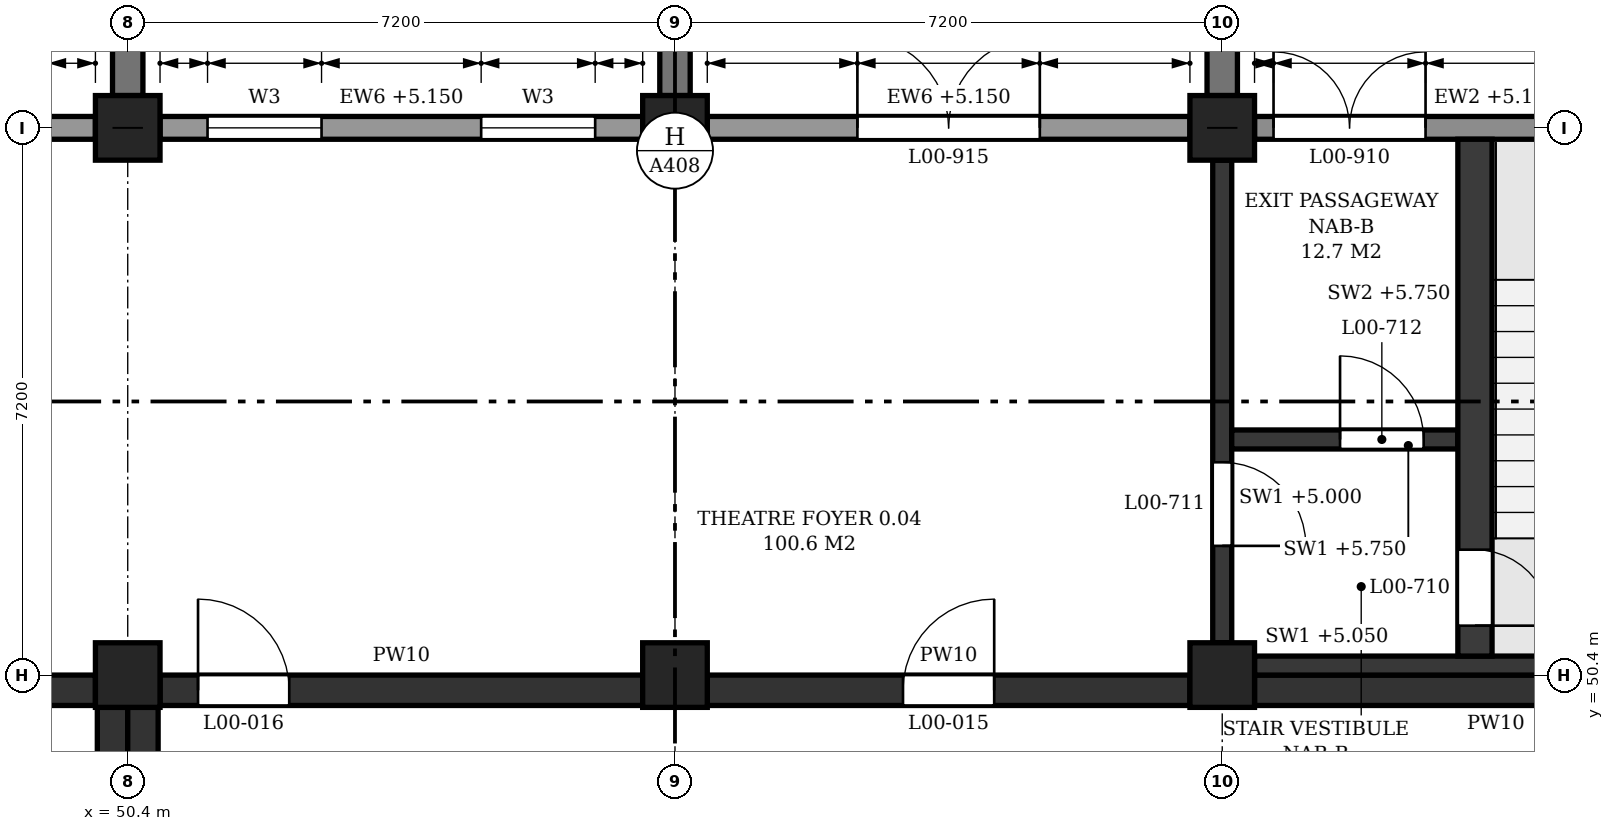
"""IFC4 building model, lengths in metres.
Left out: names, types, materials, properties, quantities, classifications, styles, units other than length and angle.
Written with IfcOpenShell. Run it as: python <this file> out.ifc"""

import sys

from ifc_helpers import new_model, si_unit, direction, frame, frame_2d, origin, origin_2d, place, context, subcontext, project, spatial, polyline, rectangle, outline, extrude, element, fill, save


model = new_model("IFC4")
c1 = context("Model", 3, precision=1e-05, world=origin(), true_north=direction((0.0, 1.0)))
c2 = subcontext(c1, "Body", "Model", "MODEL_VIEW")
j1 = project(units=[si_unit("LENGTHUNIT", "METRE"), si_unit("PLANEANGLEUNIT", "RADIAN")], contexts=[c1])
p1 = place(None, origin())
s1 = spatial("IfcSite", under=j1, at=p1, CompositionType="ELEMENT")
p2 = place(p1, origin())
s2 = spatial("IfcBuilding", under=s1, at=p2, CompositionType="ELEMENT")
p3 = place(p2, origin())
s3 = spatial("IfcBuildingStorey", under=s2, at=p3, CompositionType="ELEMENT", Elevation=0.0)
for number, where, z_axis, x_axis in (
    (1, (50.4, 50.4, 0.0), (0.0, 0.0, 1.0), (1.0, 0.0, 0.0)),
    (2, (50.4, 57.6, 0.0), (0.0, 0.0, 1.0), (1.0, 0.0, 0.0)),
    (3, (57.6, 50.4, 0.0), (0.0, 0.0, 1.0), (1.0, 0.0, 0.0)),
    (4, (57.6, 57.6, 0.0), (0.0, 0.0, 1.0), (1.0, 0.0, 0.0)),
    (5, (64.8, 50.4, 0.0), (0.0, 0.0, 1.0), (1.0, 0.0, 0.0)),
    (6, (64.8, 57.6, 0.0), (0.0, 0.0, 1.0), (1.0, 0.0, 0.0)),
):
    element("IfcColumn", number, at=place(p3, frame(where, z_axis=z_axis, x_axis=x_axis)), inside=s3, PredefinedType="COLUMN", context=c2, shape_type="SweptSolid", body=[
        extrude(rectangle(XDim=0.85, YDim=0.85, at=origin_2d()), origin(), (0.0, 0.0, 1.0), 6.0),
    ])
p4 = place(p3, frame((71.575, 57.6, 0.0), z_axis=(0.0, 0.0, 1.0), x_axis=(-1.0, 0.0, 0.0)))
e7 = element("IfcWall", 7, at=p4, inside=s3, PredefinedType="STANDARD", context=c2, shape_type="SweptSolid", body=[
    extrude(rectangle(XDim=6.35, YDim=0.3, at=frame_2d((3.175, 0.0))), origin(), (0.0, 0.0, 1.0), 5.15),
])
p5 = place(p4, frame((4.1, 0.0, 0.0)))
e8 = element("IfcOpeningElement", 8, at=p5, cuts=e7, PredefinedType="OPENING", context=c2, shape_type="SweptSolid", body=[
    extrude(rectangle(XDim=2.0, YDim=2.1, at=frame_2d((1.0, 1.05))), frame((0.0, 0.16, 0.0), z_axis=(0.0, -1.0, 0.0), x_axis=(1.0, 0.0, 0.0)), (0.0, 0.0, 1.0), 0.32),
])
p6 = place(p4, frame((0.925, 0.0, 0.9)))
e9 = element("IfcOpeningElement", 9, at=p6, cuts=e7, PredefinedType="OPENING", context=c2, shape_type="SweptSolid", body=[
    extrude(outline(polyline([(0.0, 0.0), (0.9, 0.0), (0.9, 3.55), (0.45, 4.0), (0.0, 3.55), (0.0, 0.0)])), frame((0.0, 0.16, 0.0), z_axis=(0.0, -1.0, 0.0), x_axis=(1.0, 0.0, 0.0)), (0.0, 0.0, 1.0), 0.32),
])
p7 = place(p3, frame((64.375, 57.6, 0.0), z_axis=(0.0, 0.0, 1.0), x_axis=(-1.0, 0.0, 0.0)))
e10 = element("IfcWall", 10, at=p7, inside=s3, PredefinedType="STANDARD", context=c2, shape_type="SweptSolid", body=[
    extrude(rectangle(XDim=6.35, YDim=0.3, at=frame_2d((3.175, 0.0))), origin(), (0.0, 0.0, 1.0), 5.15),
])
p8 = place(p7, frame((1.975, 0.0, 0.0)))
e11 = element("IfcOpeningElement", 11, at=p8, cuts=e10, PredefinedType="OPENING", context=c2, shape_type="SweptSolid", body=[
    extrude(outline(polyline([(0.0, 0.0), (2.4, 0.0), (2.4, 2.0), (1.2, 3.2), (0.0, 2.0), (0.0, 0.0)])), frame((0.0, 0.16, 0.0), z_axis=(0.0, -1.0, 0.0), x_axis=(1.0, 0.0, 0.0)), (0.0, 0.0, 1.0), 0.32),
])
p9 = place(p3, frame((57.175, 57.6, 0.0), z_axis=(0.0, 0.0, 1.0), x_axis=(-1.0, 0.0, 0.0)))
e12 = element("IfcWall", 12, at=p9, inside=s3, PredefinedType="STANDARD", context=c2, shape_type="SweptSolid", body=[
    extrude(rectangle(XDim=6.35, YDim=0.3, at=frame_2d((3.175, 0.0))), origin(), (0.0, 0.0, 1.0), 5.15),
])
p10 = place(p9, frame((0.625, 0.0, 0.9)))
e13 = element("IfcOpeningElement", 13, at=p10, cuts=e12, PredefinedType="OPENING", context=c2, shape_type="SweptSolid", body=[
    extrude(outline(polyline([(0.0, 0.0), (1.5, 0.0), (1.5, 3.25), (0.75, 4.0), (0.0, 3.25), (0.0, 0.0)])), frame((0.0, 0.16, 0.0), z_axis=(0.0, -1.0, 0.0), x_axis=(1.0, 0.0, 0.0)), (0.0, 0.0, 1.0), 0.32),
])
p11 = place(p9, frame((4.225, 0.0, 0.9)))
e14 = element("IfcOpeningElement", 14, at=p11, cuts=e12, PredefinedType="OPENING", context=c2, shape_type="SweptSolid", body=[
    extrude(outline(polyline([(0.0, 0.0), (1.5, 0.0), (1.5, 3.25), (0.75, 4.0), (0.0, 3.25), (0.0, 0.0)])), frame((0.0, 0.16, 0.0), z_axis=(0.0, -1.0, 0.0), x_axis=(1.0, 0.0, 0.0)), (0.0, 0.0, 1.0), 0.32),
])
p12 = place(p3, frame((49.975, 57.6, 0.0), z_axis=(0.0, 0.0, 1.0), x_axis=(-1.0, 0.0, 0.0)))
e15 = element("IfcWall", 15, at=p12, inside=s3, PredefinedType="STANDARD", context=c2, shape_type="SweptSolid", body=[
    extrude(rectangle(XDim=6.35, YDim=0.3, at=frame_2d((3.175, 0.0))), origin(), (0.0, 0.0, 1.0), 5.15),
])
p13 = place(p12, frame((0.625, 0.0, 0.9)))
e16 = element("IfcOpeningElement", 16, at=p13, cuts=e15, PredefinedType="OPENING", context=c2, shape_type="SweptSolid", body=[
    extrude(outline(polyline([(0.0, 0.0), (1.5, 0.0), (1.5, 3.25), (0.75, 4.0), (0.0, 3.25), (0.0, 0.0)])), frame((0.0, 0.16, 0.0), z_axis=(0.0, -1.0, 0.0), x_axis=(1.0, 0.0, 0.0)), (0.0, 0.0, 1.0), 0.32),
])
p14 = place(p12, frame((4.225, 0.0, 0.9)))
e17 = element("IfcOpeningElement", 17, at=p14, cuts=e15, PredefinedType="OPENING", context=c2, shape_type="SweptSolid", body=[
    extrude(outline(polyline([(0.0, 0.0), (1.5, 0.0), (1.5, 3.25), (0.75, 4.0), (0.0, 3.25), (0.0, 0.0)])), frame((0.0, 0.16, 0.0), z_axis=(0.0, -1.0, 0.0), x_axis=(1.0, 0.0, 0.0)), (0.0, 0.0, 1.0), 0.32),
])
for number, where, z_axis, x_axis in (
    (18, (50.4, 58.025, 0.0), (0.0, 0.0, 1.0), (0.0, 1.0, 0.0)),
    (19, (57.6, 58.025, 0.0), (0.0, 0.0, 1.0), (0.0, 1.0, 0.0)),
    (20, (64.8, 58.025, 0.0), (0.0, 0.0, 1.0), (0.0, 1.0, 0.0)),
):
    element("IfcWall", number, at=place(p3, frame(where, z_axis=z_axis, x_axis=x_axis)), inside=s3, PredefinedType="POLYGONAL", context=c2, shape_type="SweptSolid", body=[
        extrude(outline(polyline([(1.2, 0.0), (1.2, 9.825), (0.15, 11.4), (0.0, 11.4), (0.0, 0.0), (1.2, 0.0)])), frame((0.0, 0.2, 0.0), z_axis=(0.0, -1.0, 0.0), x_axis=(1.0, 0.0, 0.0)), (0.0, 0.0, 1.0), 0.4),
    ])
p15 = place(p3, frame((65.225, 50.525, 0.0), z_axis=(0.0, 0.0, 1.0), x_axis=(1.0, 0.0, 0.0)))
e21 = element("IfcWall", 21, at=p15, inside=s3, PredefinedType="SHEAR", context=c2, shape_type="SweptSolid", body=[
    extrude(rectangle(XDim=6.35, YDim=0.25, at=frame_2d((3.175, 0.0))), origin(), (0.0, 0.0, 1.0), 5.05),
])
p16 = place(p3, frame((64.8, 50.825, 0.0), z_axis=(0.0, 0.0, 1.0), x_axis=(0.0, 1.0, 0.0)))
e22 = element("IfcWall", 22, at=p16, inside=s3, PredefinedType="SHEAR", context=c2, shape_type="SweptSolid", body=[
    extrude(rectangle(XDim=6.35, YDim=0.25, at=frame_2d((3.175, 0.0))), origin(), (0.0, 0.0, 1.0), 5.0),
])
p17 = place(p16, frame((1.275, 0.0, 0.0)))
e23 = element("IfcOpeningElement", 23, at=p17, cuts=e22, PredefinedType="OPENING", context=c2, shape_type="SweptSolid", body=[
    extrude(rectangle(XDim=1.1, YDim=2.1, at=frame_2d((0.55, 1.05))), frame((0.0, 0.135, 0.0), z_axis=(0.0, -1.0, 0.0), x_axis=(1.0, 0.0, 0.0)), (0.0, 0.0, 1.0), 0.27),
])
p18 = place(p3, frame((68.125, 50.65, 0.0), z_axis=(0.0, 0.0, 1.0), x_axis=(0.0, 1.0, 0.0)))
e24 = element("IfcWall", 24, at=p18, inside=s3, PredefinedType="SHEAR", context=c2, shape_type="SweptSolid", body=[
    extrude(rectangle(XDim=6.8, YDim=0.45, at=frame_2d((3.4, 0.0))), origin(), (0.0, 0.0, 1.0), 5.75),
])
p19 = place(p18, frame((0.4, 0.0, 0.0)))
e25 = element("IfcOpeningElement", 25, at=p19, cuts=e24, PredefinedType="OPENING", context=c2, shape_type="SweptSolid", body=[
    extrude(rectangle(XDim=1.0, YDim=2.1, at=frame_2d((0.5, 1.05))), frame((0.0, 0.235, 0.0), z_axis=(0.0, -1.0, 0.0), x_axis=(1.0, 0.0, 0.0)), (0.0, 0.0, 1.0), 0.47),
])
p20 = place(p3, frame((64.925, 53.5, 0.0), z_axis=(0.0, 0.0, 1.0), x_axis=(1.0, 0.0, 0.0)))
e26 = element("IfcWall", 26, at=p20, inside=s3, PredefinedType="SHEAR", context=c2, shape_type="SweptSolid", body=[
    extrude(rectangle(XDim=2.975, YDim=0.25, at=frame_2d((1.487, 0.0))), origin(), (0.0, 0.0, 1.0), 5.75),
])
p21 = place(p20, frame((1.425, 0.0, 0.0)))
e27 = element("IfcOpeningElement", 27, at=p21, cuts=e26, PredefinedType="OPENING", context=c2, shape_type="SweptSolid", body=[
    extrude(rectangle(XDim=1.1, YDim=2.1, at=frame_2d((0.55, 1.05))), frame((0.0, 0.135, 0.0), z_axis=(0.0, -1.0, 0.0), x_axis=(1.0, 0.0, 0.0)), (0.0, 0.0, 1.0), 0.27),
])
p22 = place(p3, frame((43.625, 50.2, 0.0), z_axis=(0.0, 0.0, 1.0), x_axis=(1.0, 0.0, 0.0)))
e28 = element("IfcWall", 28, at=p22, inside=s3, PredefinedType="SOLIDWALL", context=c2, shape_type="SweptSolid", body=[
    extrude(rectangle(XDim=6.35, YDim=0.4, at=frame_2d((3.175, 0.0))), origin(), (0.0, 0.0, 1.0), 10.7),
])
p23 = place(p22, frame((2.575, 0.0, 0.0)))
e29 = element("IfcOpeningElement", 29, at=p23, cuts=e28, PredefinedType="OPENING", context=c2, shape_type="SweptSolid", body=[
    extrude(rectangle(XDim=1.2, YDim=2.1, at=frame_2d((0.6, 1.05))), frame((0.0, 0.21, 0.0), z_axis=(0.0, -1.0, 0.0), x_axis=(1.0, 0.0, 0.0)), (0.0, 0.0, 1.0), 0.42),
])
p24 = place(p3, frame((50.825, 50.2, 0.0), z_axis=(0.0, 0.0, 1.0), x_axis=(1.0, 0.0, 0.0)))
e30 = element("IfcWall", 30, at=p24, inside=s3, PredefinedType="SOLIDWALL", context=c2, shape_type="SweptSolid", body=[
    extrude(rectangle(XDim=6.35, YDim=0.4, at=frame_2d((3.175, 0.0))), origin(), (0.0, 0.0, 1.0), 10.7),
])
p25 = place(p24, frame((0.5, 0.0, 0.0)))
e31 = element("IfcOpeningElement", 31, at=p25, cuts=e30, PredefinedType="OPENING", context=c2, shape_type="SweptSolid", body=[
    extrude(rectangle(XDim=1.2, YDim=2.1, at=frame_2d((0.6, 1.05))), frame((0.0, 0.21, 0.0), z_axis=(0.0, -1.0, 0.0), x_axis=(1.0, 0.0, 0.0)), (0.0, 0.0, 1.0), 0.42),
])
p26 = place(p3, frame((58.025, 50.2, 0.0), z_axis=(0.0, 0.0, 1.0), x_axis=(1.0, 0.0, 0.0)))
e32 = element("IfcWall", 32, at=p26, inside=s3, PredefinedType="SOLIDWALL", context=c2, shape_type="SweptSolid", body=[
    extrude(rectangle(XDim=6.35, YDim=0.4, at=frame_2d((3.175, 0.0))), origin(), (0.0, 0.0, 1.0), 10.7),
])
p27 = place(p26, frame((2.575, 0.0, 0.0)))
e33 = element("IfcOpeningElement", 33, at=p27, cuts=e32, PredefinedType="OPENING", context=c2, shape_type="SweptSolid", body=[
    extrude(rectangle(XDim=1.2, YDim=2.1, at=frame_2d((0.6, 1.05))), frame((0.0, 0.21, 0.0), z_axis=(0.0, -1.0, 0.0), x_axis=(1.0, 0.0, 0.0)), (0.0, 0.0, 1.0), 0.42),
])
p28 = place(p3, frame((65.225, 50.2, 0.0), z_axis=(0.0, 0.0, 1.0), x_axis=(1.0, 0.0, 0.0)))
e34 = element("IfcWall", 34, at=p28, inside=s3, PredefinedType="SOLIDWALL", context=c2, shape_type="SweptSolid", body=[
    extrude(rectangle(XDim=6.35, YDim=0.4, at=frame_2d((3.175, 0.0))), origin(), (0.0, 0.0, 1.0), 10.7),
])
for number, where, z_axis, x_axis in (
    (35, (50.2, 43.625, 0.0), (0.0, 0.0, 1.0), (0.0, 1.0, 0.0)),
    (36, (50.6, 43.625, 0.0), (0.0, 0.0, 1.0), (0.0, 1.0, 0.0)),
):
    element("IfcWall", number, at=place(p3, frame(where, z_axis=z_axis, x_axis=x_axis)), inside=s3, PredefinedType="SOLIDWALL", context=c2, shape_type="SweptSolid", body=[
        extrude(rectangle(XDim=6.35, YDim=0.4, at=frame_2d((3.175, 0.0))), origin(), (0.0, 0.0, 1.0), 10.7),
    ])
p29 = place(p5, frame((2.0, 0.0, 0.0), z_axis=(0.0, 0.0, 1.0), x_axis=(-1.0, 0.0, 0.0)))
e37 = element("IfcDoor", 37, at=p29, inside=s3, OperationType="DOUBLE_DOOR_SINGLE_SWING", PredefinedType="DOOR", context=c2, shape_type="SweptSolid", body=[
    extrude(rectangle(XDim=2.0, YDim=2.1, at=frame_2d((1.0, 1.05))), frame((0.0, 0.025, 0.0), z_axis=(0.0, -1.0, 0.0), x_axis=(1.0, 0.0, 0.0)), (0.0, 0.0, 1.0), 0.05),
])
fill(e8, e37)
p30 = place(p8, frame((2.4, 0.0, 0.0), z_axis=(0.0, 0.0, 1.0), x_axis=(-1.0, 0.0, 0.0)))
e38 = element("IfcDoor", 38, at=p30, inside=s3, OperationType="DOUBLE_DOOR_SINGLE_SWING", PredefinedType="DOOR", context=c2, shape_type="SweptSolid", body=[
    extrude(outline(polyline([(2.4, 2.0), (1.2, 3.2), (0.0, 2.0), (0.0, 0.0), (2.4, 0.0), (2.4, 2.0)])), frame((0.0, 0.025, 0.0), z_axis=(0.0, -1.0, 0.0), x_axis=(1.0, 0.0, 0.0)), (0.0, 0.0, 1.0), 0.05),
])
fill(e11, e38)
p31 = place(p10, origin())
e39 = element("IfcWindow", 39, at=p31, inside=s3, PartitioningType="SINGLE_PANEL", PredefinedType="WINDOW", context=c2, shape_type="SweptSolid", body=[
    extrude(outline(polyline([(0.0, 0.0), (1.5, 0.0), (1.5, 3.25), (0.75, 4.0), (0.0, 3.25), (0.0, 0.0)])), frame((0.0, 0.03, 0.0), z_axis=(0.0, -1.0, 0.0), x_axis=(1.0, 0.0, 0.0)), (0.0, 0.0, 1.0), 0.06),
])
fill(e13, e39)
p32 = place(p11, origin())
e40 = element("IfcWindow", 40, at=p32, inside=s3, PartitioningType="SINGLE_PANEL", PredefinedType="WINDOW", context=c2, shape_type="SweptSolid", body=[
    extrude(outline(polyline([(0.0, 0.0), (1.5, 0.0), (1.5, 3.25), (0.75, 4.0), (0.0, 3.25), (0.0, 0.0)])), frame((0.0, 0.03, 0.0), z_axis=(0.0, -1.0, 0.0), x_axis=(1.0, 0.0, 0.0)), (0.0, 0.0, 1.0), 0.06),
])
fill(e14, e40)
p33 = place(p19, frame((1.0, 0.0, 0.0), z_axis=(0.0, 0.0, 1.0), x_axis=(-1.0, 0.0, 0.0)))
e41 = element("IfcDoor", 41, at=p33, inside=s3, OperationType="SINGLE_SWING_RIGHT", PredefinedType="DOOR", context=c2, shape_type="SweptSolid", body=[
    extrude(rectangle(XDim=1.0, YDim=2.1, at=frame_2d((0.5, 1.05))), frame((0.0, 0.025, 0.0), z_axis=(0.0, -1.0, 0.0), x_axis=(1.0, 0.0, 0.0)), (0.0, 0.0, 1.0), 0.05),
])
fill(e25, e41)
p34 = place(p17, frame((1.1, 0.0, 0.0), z_axis=(0.0, 0.0, 1.0), x_axis=(-1.0, 0.0, 0.0)))
e42 = element("IfcDoor", 42, at=p34, inside=s3, OperationType="SINGLE_SWING_RIGHT", PredefinedType="DOOR", context=c2, shape_type="SweptSolid", body=[
    extrude(rectangle(XDim=1.1, YDim=2.1, at=frame_2d((0.55, 1.05))), frame((0.0, 0.025, 0.0), z_axis=(0.0, -1.0, 0.0), x_axis=(1.0, 0.0, 0.0)), (0.0, 0.0, 1.0), 0.05),
])
fill(e23, e42)
p35 = place(p21, origin())
e43 = element("IfcDoor", 43, at=p35, inside=s3, OperationType="SINGLE_SWING_LEFT", PredefinedType="DOOR", context=c2, shape_type="SweptSolid", body=[
    extrude(rectangle(XDim=1.1, YDim=2.1, at=frame_2d((0.55, 1.05))), frame((0.0, 0.025, 0.0), z_axis=(0.0, -1.0, 0.0), x_axis=(1.0, 0.0, 0.0)), (0.0, 0.0, 1.0), 0.05),
])
fill(e27, e43)
p36 = place(p27, origin())
e44 = element("IfcDoor", 44, at=p36, inside=s3, OperationType="SINGLE_SWING_RIGHT", PredefinedType="DOOR", context=c2, shape_type="SweptSolid", body=[
    extrude(rectangle(XDim=1.2, YDim=2.1, at=frame_2d((0.6, 1.05))), frame((0.0, 0.025, 0.0), z_axis=(0.0, -1.0, 0.0), x_axis=(1.0, 0.0, 0.0)), (0.0, 0.0, 1.0), 0.05),
])
fill(e33, e44)
p37 = place(p25, origin())
e45 = element("IfcDoor", 45, at=p37, inside=s3, OperationType="SINGLE_SWING_LEFT", PredefinedType="DOOR", context=c2, shape_type="SweptSolid", body=[
    extrude(rectangle(XDim=1.2, YDim=2.1, at=frame_2d((0.6, 1.05))), frame((0.0, 0.025, 0.0), z_axis=(0.0, -1.0, 0.0), x_axis=(1.0, 0.0, 0.0)), (0.0, 0.0, 1.0), 0.05),
])
fill(e31, e45)
save(model, sys.argv[1])
